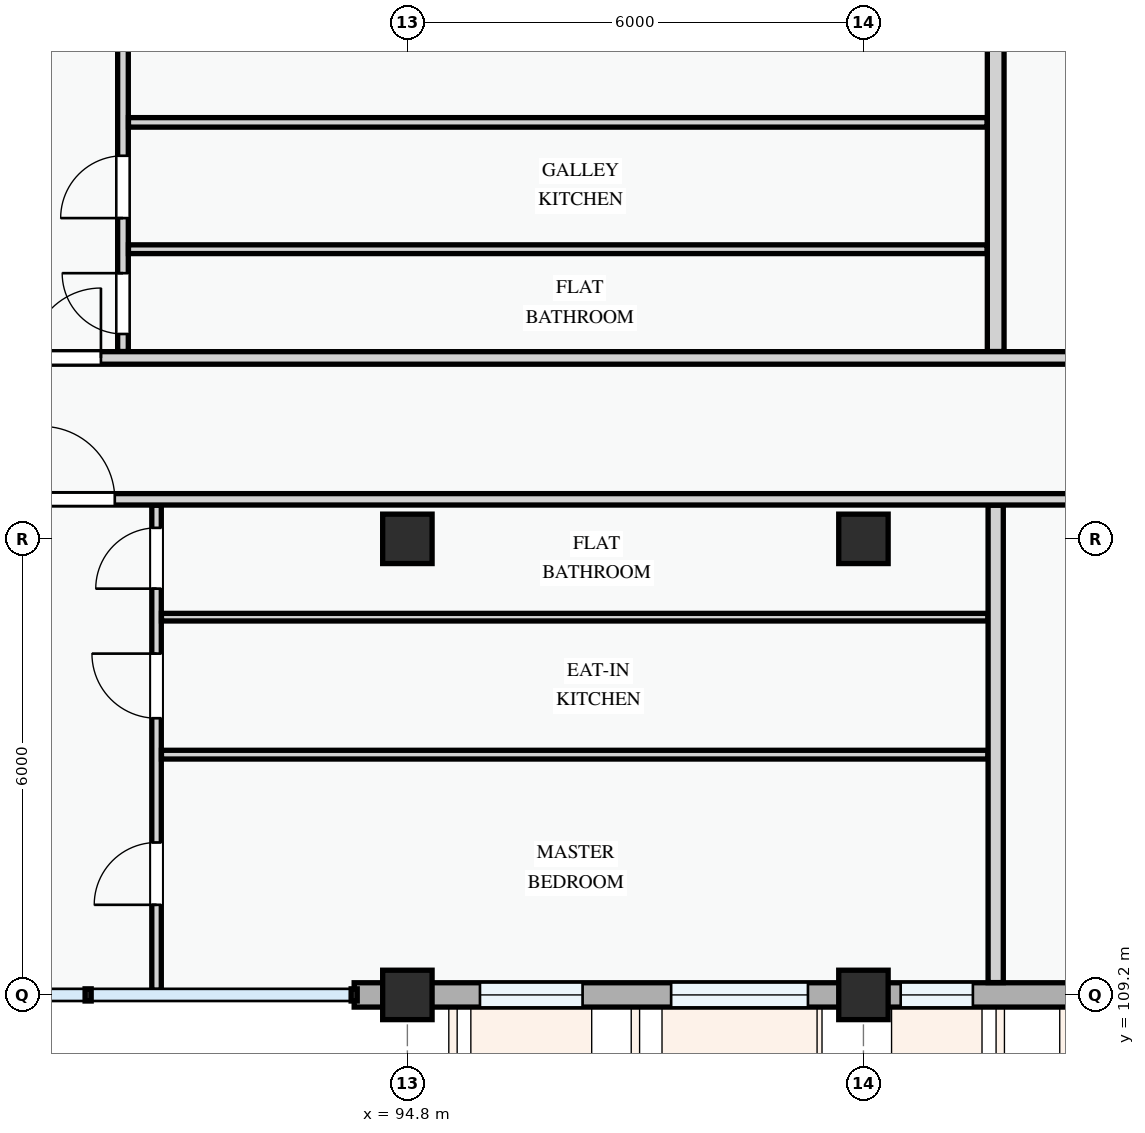
"""IFC4 building model, lengths in metres.
Left out: names, types, materials, properties, quantities, classifications, styles, units other than length and angle.
Written with IfcOpenShell. Run it as: python <this file> out.ifc"""

import sys

from ifc_helpers import new_model, si_unit, direction, frame, frame_2d, origin, origin_2d, place, context, subcontext, project, spatial, rectangle, extrude, element, fill, save


model = new_model("IFC4")
c1 = context("Model", 3, precision=1e-05, world=origin(), true_north=direction((0.0, 1.0)))
c2 = subcontext(c1, "Body", "Model", "MODEL_VIEW")
j1 = project(units=[si_unit("LENGTHUNIT", "METRE"), si_unit("PLANEANGLEUNIT", "RADIAN")], contexts=[c1])
p1 = place(None, origin())
s1 = spatial("IfcSite", under=j1, at=p1, CompositionType="ELEMENT")
p2 = place(p1, origin())
s2 = spatial("IfcBuilding", under=s1, at=p2, CompositionType="ELEMENT")
p3 = place(p2, frame((0.0, 0.0, 18.0)))
s3 = spatial("IfcBuildingStorey", under=s2, at=p3, CompositionType="ELEMENT", Elevation=18.0)
for number, where, z_axis, x_axis in (
    (1, (94.8, 109.2, 0.0), (0.0, 0.0, 1.0), (1.0, 0.0, 0.0)),
    (2, (94.8, 115.2, 0.0), (0.0, 0.0, 1.0), (1.0, 0.0, 0.0)),
    (3, (100.8, 109.2, 0.0), (0.0, 0.0, 1.0), (1.0, 0.0, 0.0)),
    (4, (100.8, 115.2, 0.0), (0.0, 0.0, 1.0), (1.0, 0.0, 0.0)),
):
    element("IfcColumn", number, at=place(p3, frame(where, z_axis=z_axis, x_axis=x_axis)), inside=s3, PredefinedType="COLUMN", context=c2, shape_type="SweptSolid", body=[
        extrude(rectangle(XDim=0.65, YDim=0.65, at=origin_2d()), origin(), (0.0, 0.0, 1.0), 3.3),
    ])
p4 = place(p3, frame((94.1, 109.2, 0.0), z_axis=(0.0, 0.0, 1.0), x_axis=(1.0, 0.0, 0.0)))
e5 = element("IfcWall", 5, at=p4, inside=s3, PredefinedType="STANDARD", context=c2, shape_type="SweptSolid", body=[
    extrude(rectangle(XDim=0.7, YDim=0.32, at=frame_2d((0.35, 0.0))), origin(), (0.0, 0.0, 1.0), 2.375),
])
p5 = place(p3, frame((94.8, 109.2, 0.0), z_axis=(0.0, 0.0, 1.0), x_axis=(1.0, 0.0, 0.0)))
e6 = element("IfcWall", 6, at=p5, inside=s3, PredefinedType="STANDARD", context=c2, shape_type="SweptSolid", body=[
    extrude(rectangle(XDim=6.0, YDim=0.32, at=frame_2d((3.0, 0.0))), origin(), (0.0, 0.0, 1.0), 2.475),
])
p6 = place(p5, frame((0.955, 0.0, 0.78)))
e7 = element("IfcOpeningElement", 7, at=p6, cuts=e6, PredefinedType="OPENING", context=c2, shape_type="SweptSolid", body=[
    extrude(rectangle(XDim=1.35, YDim=1.55, at=frame_2d((0.675, 0.775))), frame((0.0, 0.17, 0.0), z_axis=(0.0, -1.0, 0.0), x_axis=(1.0, 0.0, 0.0)), (0.0, 0.0, 1.0), 0.34),
])
p7 = place(p5, frame((3.47, 0.0, 0.78)))
e8 = element("IfcOpeningElement", 8, at=p7, cuts=e6, PredefinedType="OPENING", context=c2, shape_type="SweptSolid", body=[
    extrude(rectangle(XDim=1.8, YDim=1.5, at=frame_2d((0.9, 0.75))), frame((0.0, 0.17, 0.0), z_axis=(0.0, -1.0, 0.0), x_axis=(1.0, 0.0, 0.0)), (0.0, 0.0, 1.0), 0.34),
])
p8 = place(p3, frame((100.8, 109.2, 0.0), z_axis=(0.0, 0.0, 1.0), x_axis=(1.0, 0.0, 0.0)))
e9 = element("IfcWall", 9, at=p8, inside=s3, PredefinedType="STANDARD", context=c2, shape_type="SweptSolid", body=[
    extrude(rectangle(XDim=8.4, YDim=0.32, at=frame_2d((4.2, 0.0))), origin(), (0.0, 0.0, 1.0), 2.375),
])
p9 = place(p8, frame((0.49, 0.0, 0.78)))
e10 = element("IfcOpeningElement", 10, at=p9, cuts=e9, PredefinedType="OPENING", context=c2, shape_type="SweptSolid", body=[
    extrude(rectangle(XDim=0.95, YDim=1.15, at=frame_2d((0.475, 0.575))), frame((0.0, 0.17, 0.0), z_axis=(0.0, -1.0, 0.0), x_axis=(1.0, 0.0, 0.0)), (0.0, 0.0, 1.0), 0.34),
])
p10 = place(p8, frame((2.702, 0.0, 0.78)))
e11 = element("IfcOpeningElement", 11, at=p10, cuts=e9, PredefinedType="OPENING", context=c2, shape_type="SweptSolid", body=[
    extrude(rectangle(XDim=1.38, YDim=1.48, at=frame_2d((0.69, 0.74))), frame((0.0, 0.17, 0.0), z_axis=(0.0, -1.0, 0.0), x_axis=(1.0, 0.0, 0.0)), (0.0, 0.0, 1.0), 0.34),
])
p11 = place(p8, frame((5.647, 0.0, 0.78)))
e12 = element("IfcOpeningElement", 12, at=p11, cuts=e9, PredefinedType="OPENING", context=c2, shape_type="SweptSolid", body=[
    extrude(rectangle(XDim=1.82, YDim=1.46, at=frame_2d((0.91, 0.73))), frame((0.0, 0.17, 0.0), z_axis=(0.0, -1.0, 0.0), x_axis=(1.0, 0.0, 0.0)), (0.0, 0.0, 1.0), 0.34),
])
p12 = place(p3, frame((91.5, 109.26, 0.0), z_axis=(0.0, 0.0, 1.0), x_axis=(0.0, 1.0, 0.0)))
e13 = element("IfcWall", 13, at=p12, inside=s3, PredefinedType="PARTITIONING", context=c2, shape_type="SweptSolid", body=[
    extrude(rectangle(XDim=6.383, YDim=0.125, at=frame_2d((3.191, 0.0))), origin(), (0.0, 0.0, 1.0), 3.0),
])
p13 = place(p12, frame((1.125, 0.0, 0.0)))
e14 = element("IfcOpeningElement", 14, at=p13, cuts=e13, PredefinedType="OPENING", context=c2, shape_type="SweptSolid", body=[
    extrude(rectangle(XDim=0.82, YDim=2.08, at=frame_2d((0.41, 1.04))), frame((0.0, 0.073, 0.0), z_axis=(0.0, -1.0, 0.0), x_axis=(1.0, 0.0, 0.0)), (0.0, 0.0, 1.0), 0.145),
])
p14 = place(p12, frame((3.58, 0.0, 0.0)))
e15 = element("IfcOpeningElement", 15, at=p14, cuts=e13, PredefinedType="OPENING", context=c2, shape_type="SweptSolid", body=[
    extrude(rectangle(XDim=0.85, YDim=2.1, at=frame_2d((0.425, 1.05))), frame((0.0, 0.073, 0.0), z_axis=(0.0, -1.0, 0.0), x_axis=(1.0, 0.0, 0.0)), (0.0, 0.0, 1.0), 0.145),
])
p15 = place(p12, frame((5.285, 0.0, 0.0)))
e16 = element("IfcOpeningElement", 16, at=p15, cuts=e13, PredefinedType="OPENING", context=c2, shape_type="SweptSolid", body=[
    extrude(rectangle(XDim=0.8, YDim=2.1, at=frame_2d((0.4, 1.05))), frame((0.0, 0.073, 0.0), z_axis=(0.0, -1.0, 0.0), x_axis=(1.0, 0.0, 0.0)), (0.0, 0.0, 1.0), 0.145),
])
p16 = place(p3, frame((91.564, 112.361, 0.0), z_axis=(0.0, 0.0, 1.0), x_axis=(1.0, 0.0, 0.0)))
e17 = element("IfcWall", 17, at=p16, inside=s3, PredefinedType="PARTITIONING", context=c2, shape_type="SweptSolid", body=[
    extrude(rectangle(XDim=10.874, YDim=0.115, at=frame_2d((5.437, 0.0))), origin(), (0.0, 0.0, 1.0), 3.0),
])
p17 = place(p3, frame((91.564, 114.17, 0.0), z_axis=(0.0, 0.0, 1.0), x_axis=(1.0, 0.0, 0.0)))
e18 = element("IfcWall", 18, at=p17, inside=s3, PredefinedType="PARTITIONING", context=c2, shape_type="SweptSolid", body=[
    extrude(rectangle(XDim=10.874, YDim=0.1, at=frame_2d((5.437, 0.0))), origin(), (0.0, 0.0, 1.0), 3.0),
])
p18 = place(p3, frame((91.058, 117.665, 0.0), z_axis=(0.0, 0.0, 1.0), x_axis=(0.0, 1.0, 0.0)))
e19 = element("IfcWall", 19, at=p18, inside=s3, PredefinedType="PARTITIONING", context=c2, shape_type="SweptSolid", body=[
    extrude(rectangle(XDim=5.773, YDim=0.14, at=frame_2d((2.887, 0.0))), origin(), (0.0, 0.0, 1.0), 3.0),
])
p19 = place(p18, frame((0.231, 0.0, 0.0)))
e20 = element("IfcOpeningElement", 20, at=p19, cuts=e19, PredefinedType="OPENING", context=c2, shape_type="SweptSolid", body=[
    extrude(rectangle(XDim=0.8, YDim=2.1, at=frame_2d((0.4, 1.05))), frame((0.0, 0.08, 0.0), z_axis=(0.0, -1.0, 0.0), x_axis=(1.0, 0.0, 0.0)), (0.0, 0.0, 1.0), 0.16),
])
p20 = place(p18, frame((1.755, 0.0, 0.0)))
e21 = element("IfcOpeningElement", 21, at=p20, cuts=e19, PredefinedType="OPENING", context=c2, shape_type="SweptSolid", body=[
    extrude(rectangle(XDim=0.82, YDim=2.08, at=frame_2d((0.41, 1.04))), frame((0.0, 0.08, 0.0), z_axis=(0.0, -1.0, 0.0), x_axis=(1.0, 0.0, 0.0)), (0.0, 0.0, 1.0), 0.16),
])
p21 = place(p18, frame((4.02, 0.0, 0.0)))
e22 = element("IfcOpeningElement", 22, at=p21, cuts=e19, PredefinedType="OPENING", context=c2, shape_type="SweptSolid", body=[
    extrude(rectangle(XDim=0.85, YDim=2.1, at=frame_2d((0.425, 1.05))), frame((0.0, 0.08, 0.0), z_axis=(0.0, -1.0, 0.0), x_axis=(1.0, 0.0, 0.0)), (0.0, 0.0, 1.0), 0.16),
])
p22 = place(p3, frame((91.13, 120.679, 0.0), z_axis=(0.0, 0.0, 1.0), x_axis=(1.0, 0.0, 0.0)))
e23 = element("IfcWall", 23, at=p22, inside=s3, PredefinedType="PARTITIONING", context=c2, shape_type="SweptSolid", body=[
    extrude(rectangle(XDim=11.298, YDim=0.125, at=frame_2d((5.649, 0.0))), origin(), (0.0, 0.0, 1.0), 3.0),
])
p23 = place(p3, frame((91.13, 119.01, 0.0), z_axis=(0.0, 0.0, 1.0), x_axis=(1.0, 0.0, 0.0)))
e24 = element("IfcWall", 24, at=p23, inside=s3, PredefinedType="PARTITIONING", context=c2, shape_type="SweptSolid", body=[
    extrude(rectangle(XDim=11.298, YDim=0.115, at=frame_2d((5.649, 0.0))), origin(), (0.0, 0.0, 1.0), 3.0),
])
p24 = place(p3, frame((102.54, 109.362, 0.0), z_axis=(0.0, 0.0, 1.0), x_axis=(0.0, 1.0, 0.0)))
e25 = element("IfcWall", 25, at=p24, inside=s3, PredefinedType="PARTITIONING", context=c2, shape_type="SweptSolid", body=[
    extrude(rectangle(XDim=6.281, YDim=0.2, at=frame_2d((3.141, 0.0))), origin(), (0.0, 0.0, 1.0), 3.0),
])
p25 = place(p3, frame((102.54, 117.665, 0.0), z_axis=(0.0, 0.0, 1.0), x_axis=(0.0, 1.0, 0.0)))
e26 = element("IfcWall", 26, at=p25, inside=s3, PredefinedType="PARTITIONING", context=c2, shape_type="SweptSolid", body=[
    extrude(rectangle(XDim=5.773, YDim=0.22, at=frame_2d((2.887, 0.0))), origin(), (0.0, 0.0, 1.0), 3.0),
])
p26 = place(p3, frame((80.562, 115.72, 0.0), z_axis=(0.0, 0.0, 1.0), x_axis=(1.0, 0.0, 0.0)))
e27 = element("IfcWall", 27, at=p26, inside=s3, PredefinedType="PARTITIONING", context=c2, shape_type="SweptSolid", body=[
    extrude(rectangle(XDim=69.488, YDim=0.15, at=frame_2d((34.744, 0.0))), origin(), (0.0, 0.0, 1.0), 3.0),
])
p27 = place(p26, frame((9.429, 0.0, 0.0)))
e28 = element("IfcOpeningElement", 28, at=p27, cuts=e27, PredefinedType="OPENING", context=c2, shape_type="SweptSolid", body=[
    extrude(rectangle(XDim=0.96, YDim=2.12, at=frame_2d((0.48, 1.06))), frame((0.0, 0.085, 0.0), z_axis=(0.0, -1.0, 0.0), x_axis=(1.0, 0.0, 0.0)), (0.0, 0.0, 1.0), 0.17),
])
p28 = place(p26, frame((24.004, 0.0, 0.0)))
e29 = element("IfcOpeningElement", 29, at=p28, cuts=e27, PredefinedType="OPENING", context=c2, shape_type="SweptSolid", body=[
    extrude(rectangle(XDim=0.92, YDim=2.1, at=frame_2d((0.46, 1.05))), frame((0.0, 0.085, 0.0), z_axis=(0.0, -1.0, 0.0), x_axis=(1.0, 0.0, 0.0)), (0.0, 0.0, 1.0), 0.17),
])
p29 = place(p26, frame((52.697, 0.0, 0.0)))
e30 = element("IfcOpeningElement", 30, at=p29, cuts=e27, PredefinedType="OPENING", context=c2, shape_type="SweptSolid", body=[
    extrude(rectangle(XDim=0.92, YDim=2.1, at=frame_2d((0.46, 1.05))), frame((0.0, 0.085, 0.0), z_axis=(0.0, -1.0, 0.0), x_axis=(1.0, 0.0, 0.0)), (0.0, 0.0, 1.0), 0.17),
])
p30 = place(p3, frame((80.562, 117.58, 0.0), z_axis=(0.0, 0.0, 1.0), x_axis=(1.0, 0.0, 0.0)))
e31 = element("IfcWall", 31, at=p30, inside=s3, PredefinedType="PARTITIONING", context=c2, shape_type="SweptSolid", body=[
    extrude(rectangle(XDim=71.978, YDim=0.165, at=frame_2d((35.989, 0.0))), origin(), (0.0, 0.0, 1.0), 3.0),
])
p31 = place(p30, frame((9.286, 0.0, 0.0)))
e32 = element("IfcOpeningElement", 32, at=p31, cuts=e31, PredefinedType="OPENING", context=c2, shape_type="SweptSolid", body=[
    extrude(rectangle(XDim=0.92, YDim=2.1, at=frame_2d((0.46, 1.05))), frame((0.0, 0.093, 0.0), z_axis=(0.0, -1.0, 0.0), x_axis=(1.0, 0.0, 0.0)), (0.0, 0.0, 1.0), 0.185),
])
p32 = place(p30, frame((23.993, 0.0, 0.0)))
e33 = element("IfcOpeningElement", 33, at=p32, cuts=e31, PredefinedType="OPENING", context=c2, shape_type="SweptSolid", body=[
    extrude(rectangle(XDim=0.92, YDim=2.1, at=frame_2d((0.46, 1.05))), frame((0.0, 0.093, 0.0), z_axis=(0.0, -1.0, 0.0), x_axis=(1.0, 0.0, 0.0)), (0.0, 0.0, 1.0), 0.185),
])
p33 = place(p30, frame((52.703, 0.0, 0.0)))
e34 = element("IfcOpeningElement", 34, at=p33, cuts=e31, PredefinedType="OPENING", context=c2, shape_type="SweptSolid", body=[
    extrude(rectangle(XDim=0.96, YDim=2.12, at=frame_2d((0.48, 1.06))), frame((0.0, 0.093, 0.0), z_axis=(0.0, -1.0, 0.0), x_axis=(1.0, 0.0, 0.0)), (0.0, 0.0, 1.0), 0.185),
])
p34 = place(p6, origin())
e35 = element("IfcWindow", 35, at=p34, inside=s3, PartitioningType="SINGLE_PANEL", PredefinedType="WINDOW", context=c2, shape_type="SweptSolid", body=[
    extrude(rectangle(XDim=1.35, YDim=1.55, at=frame_2d((0.675, 0.775))), frame((0.0, 0.03, 0.0), z_axis=(0.0, -1.0, 0.0), x_axis=(1.0, 0.0, 0.0)), (0.0, 0.0, 1.0), 0.06),
])
fill(e7, e35)
p35 = place(p7, origin())
e36 = element("IfcWindow", 36, at=p35, inside=s3, PartitioningType="DOUBLE_PANEL_VERTICAL", PredefinedType="WINDOW", context=c2, shape_type="SweptSolid", body=[
    extrude(rectangle(XDim=1.8, YDim=1.5, at=frame_2d((0.9, 0.75))), frame((0.0, 0.03, 0.0), z_axis=(0.0, -1.0, 0.0), x_axis=(1.0, 0.0, 0.0)), (0.0, 0.0, 1.0), 0.06),
])
fill(e8, e36)
p36 = place(p9, origin())
e37 = element("IfcWindow", 37, at=p36, inside=s3, PartitioningType="SINGLE_PANEL", PredefinedType="WINDOW", context=c2, shape_type="SweptSolid", body=[
    extrude(rectangle(XDim=0.95, YDim=1.15, at=frame_2d((0.475, 0.575))), frame((0.0, 0.03, 0.0), z_axis=(0.0, -1.0, 0.0), x_axis=(1.0, 0.0, 0.0)), (0.0, 0.0, 1.0), 0.06),
])
fill(e10, e37)
p37 = place(p13, origin())
e38 = element("IfcDoor", 38, at=p37, inside=s3, OperationType="SINGLE_SWING_LEFT", PredefinedType="DOOR", context=c2, shape_type="SweptSolid", body=[
    extrude(rectangle(XDim=0.82, YDim=2.08, at=frame_2d((0.41, 1.04))), frame((0.0, 0.025, 0.0), z_axis=(0.0, -1.0, 0.0), x_axis=(1.0, 0.0, 0.0)), (0.0, 0.0, 1.0), 0.05),
])
fill(e14, e38)
p38 = place(p14, origin())
e39 = element("IfcDoor", 39, at=p38, inside=s3, OperationType="SINGLE_SWING_RIGHT", PredefinedType="DOOR", context=c2, shape_type="SweptSolid", body=[
    extrude(rectangle(XDim=0.85, YDim=2.1, at=frame_2d((0.425, 1.05))), frame((0.0, 0.025, 0.0), z_axis=(0.0, -1.0, 0.0), x_axis=(1.0, 0.0, 0.0)), (0.0, 0.0, 1.0), 0.05),
])
fill(e15, e39)
p39 = place(p15, origin())
e40 = element("IfcDoor", 40, at=p39, inside=s3, OperationType="SINGLE_SWING_LEFT", PredefinedType="DOOR", context=c2, shape_type="SweptSolid", body=[
    extrude(rectangle(XDim=0.8, YDim=2.1, at=frame_2d((0.4, 1.05))), frame((0.0, 0.025, 0.0), z_axis=(0.0, -1.0, 0.0), x_axis=(1.0, 0.0, 0.0)), (0.0, 0.0, 1.0), 0.05),
])
fill(e16, e40)
p40 = place(p19, origin())
e41 = element("IfcDoor", 41, at=p40, inside=s3, OperationType="SINGLE_SWING_RIGHT", PredefinedType="DOOR", context=c2, shape_type="SweptSolid", body=[
    extrude(rectangle(XDim=0.8, YDim=2.1, at=frame_2d((0.4, 1.05))), frame((0.0, 0.025, 0.0), z_axis=(0.0, -1.0, 0.0), x_axis=(1.0, 0.0, 0.0)), (0.0, 0.0, 1.0), 0.05),
])
fill(e20, e41)
p41 = place(p20, origin())
e42 = element("IfcDoor", 42, at=p41, inside=s3, OperationType="SINGLE_SWING_LEFT", PredefinedType="DOOR", context=c2, shape_type="SweptSolid", body=[
    extrude(rectangle(XDim=0.82, YDim=2.08, at=frame_2d((0.41, 1.04))), frame((0.0, 0.025, 0.0), z_axis=(0.0, -1.0, 0.0), x_axis=(1.0, 0.0, 0.0)), (0.0, 0.0, 1.0), 0.05),
])
fill(e21, e42)
p42 = place(p27, origin())
e43 = element("IfcDoor", 43, at=p42, inside=s3, OperationType="SINGLE_SWING_LEFT", PredefinedType="DOOR", context=c2, shape_type="SweptSolid", body=[
    extrude(rectangle(XDim=0.96, YDim=2.12, at=frame_2d((0.48, 1.06))), frame((0.0, 0.025, 0.0), z_axis=(0.0, -1.0, 0.0), x_axis=(1.0, 0.0, 0.0)), (0.0, 0.0, 1.0), 0.05),
])
fill(e28, e43)
p43 = place(p31, origin())
e44 = element("IfcDoor", 44, at=p43, inside=s3, OperationType="SINGLE_SWING_RIGHT", PredefinedType="DOOR", context=c2, shape_type="SweptSolid", body=[
    extrude(rectangle(XDim=0.92, YDim=2.1, at=frame_2d((0.46, 1.05))), frame((0.0, 0.025, 0.0), z_axis=(0.0, -1.0, 0.0), x_axis=(1.0, 0.0, 0.0)), (0.0, 0.0, 1.0), 0.05),
])
fill(e32, e44)
save(model, sys.argv[1])
